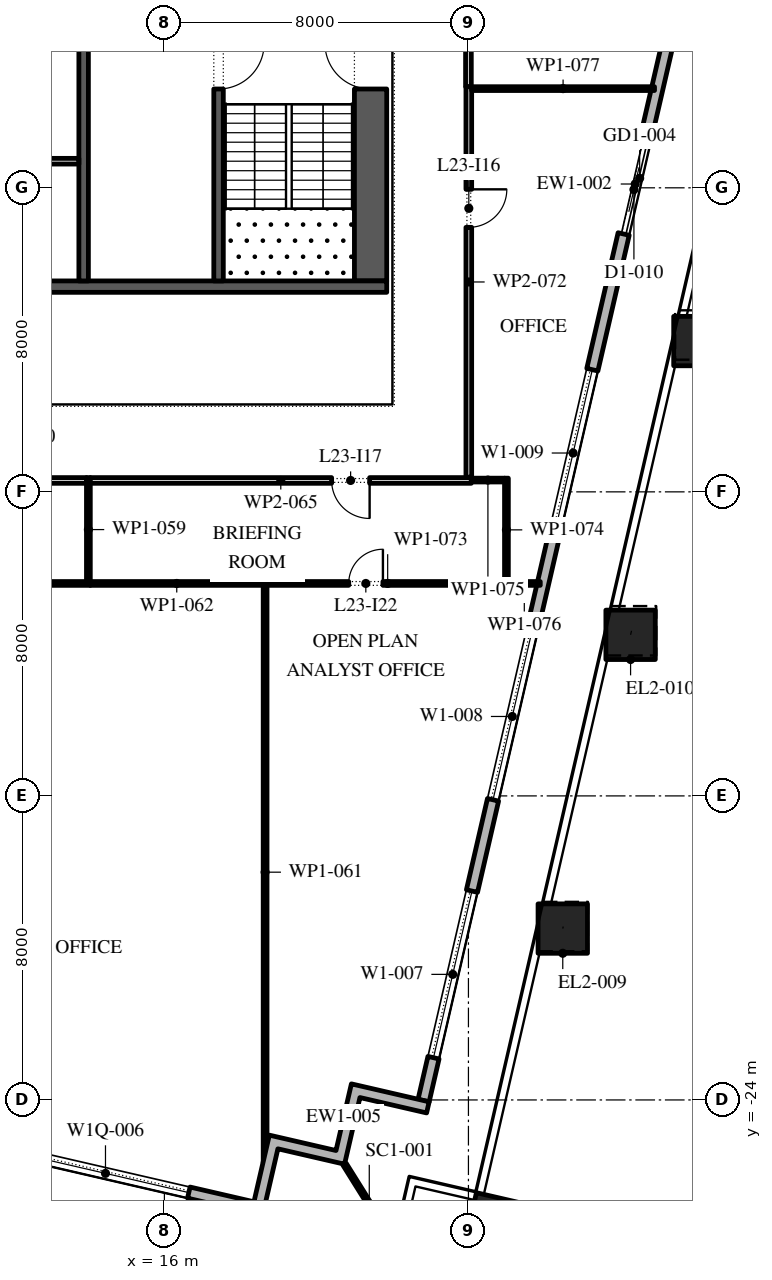
"""IFC4 building model, lengths in metres.
Left out: names, types, materials, properties, quantities, classifications, styles, units other than length and angle.
Written with IfcOpenShell. Run it as: python <this file> out.ifc"""

import sys

from ifc_helpers import new_model, si_unit, direction, frame, frame_2d, origin, origin_2d, place, context, subcontext, project, spatial, polyline, rectangle, outline, extrude, element, fill, save


model = new_model("IFC4")
c1 = context("Model", 3, precision=1e-05, world=origin(), true_north=direction((0.0, 1.0)))
c2 = subcontext(c1, "Body", "Model", "MODEL_VIEW")
j1 = project(units=[si_unit("LENGTHUNIT", "METRE"), si_unit("PLANEANGLEUNIT", "RADIAN")], contexts=[c1])
p1 = place(None, origin())
s1 = spatial("IfcSite", under=j1, at=p1, CompositionType="ELEMENT")
p2 = place(p1, origin())
s2 = spatial("IfcBuilding", under=s1, at=p2, CompositionType="ELEMENT")
p3 = place(p2, frame((0.0, 0.0, 109.8)))
s3 = spatial("IfcBuildingStorey", under=s2, at=p3, CompositionType="ELEMENT", Elevation=109.8)
p4 = place(p3, frame((24.698, -27.22, 0.0), z_axis=(0.0, 0.0, 1.0), x_axis=(0.974370064785, -0.224951054344, 0.0)))
e1 = element("IfcColumn", 1, at=p4, inside=s3, PredefinedType="COLUMN", context=c2, shape_type="SweptSolid", body=[
    extrude(rectangle(XDim=1.3, YDim=1.3, at=origin_2d()), origin(), (0.0, 0.0, 1.0), 4.2),
])
p5 = place(p3, frame((26.482, -19.491, 0.0), z_axis=(0.002906226325, 0.012613022249, 0.99991622925), x_axis=(-0.974466825284, 0.224531526563, 0.0)))
e2 = element("IfcColumn", 2, at=p5, inside=s3, PredefinedType="COLUMN", context=c2, shape_type="SweptSolid", body=[
    extrude(rectangle(XDim=1.3, YDim=1.3, at=origin_2d()), origin(), (0.0, 0.0, 1.0), 4.2),
])
p6 = place(p3, frame((28.267, -11.762, 0.0), z_axis=(0.005810983994, 0.025277780376, 0.999663576552), x_axis=(-0.974579651079, 0.224041299099, 0.0)))
e3 = element("IfcColumn", 3, at=p6, inside=s3, PredefinedType="COLUMN", context=c2, shape_type="SweptSolid", body=[
    extrude(rectangle(XDim=1.3, YDim=1.3, at=origin_2d()), origin(), (0.0, 0.0, 1.0), 4.201),
])
p7 = place(p3, frame((30.051, -4.032, 0.0), z_axis=(0.008770884695, 0.037929719907, 0.99924191662), x_axis=(-0.974290512438, 0.225295355862, 0.0)))
e4 = element("IfcColumn", 4, at=p7, inside=s3, PredefinedType="COLUMN", context=c2, shape_type="SweptSolid", body=[
    extrude(rectangle(XDim=1.3, YDim=1.3, at=origin_2d()), origin(), (0.0, 0.0, 1.0), 4.203),
])
p8 = place(p3, frame((-31.078, -15.421, 0.0), z_axis=(0.0, 0.0, 1.0), x_axis=(0.974370456532, -0.224949357493, 0.0)))
e5 = element("IfcWall", 5, at=p8, inside=s3, PredefinedType="STANDARD", context=c2, shape_type="SweptSolid", body=[
    extrude(rectangle(XDim=51.0, YDim=0.3, at=frame_2d((25.5, 0.0))), origin(), (0.0, 0.0, 1.0), 4.0),
])
p9 = place(p8, frame((1.875, 0.0, 0.45)))
e6 = element("IfcOpeningElement", 6, at=p9, cuts=e5, PredefinedType="OPENING", context=c2, shape_type="SweptSolid", body=[
    extrude(rectangle(XDim=4.5, YDim=2.65, at=frame_2d((2.25, 1.325))), frame((0.0, 0.16, 0.0), z_axis=(0.0, -1.0, 0.0), x_axis=(1.0, 0.0, 0.0)), (0.0, 0.0, 1.0), 0.32),
])
p10 = place(p8, frame((10.275, 0.0, 0.45)))
e7 = element("IfcOpeningElement", 7, at=p10, cuts=e5, PredefinedType="OPENING", context=c2, shape_type="SweptSolid", body=[
    extrude(rectangle(XDim=4.5, YDim=2.525, at=frame_2d((2.25, 1.262))), frame((0.0, 0.16, 0.0), z_axis=(0.0, -1.0, 0.0), x_axis=(1.0, 0.0, 0.0)), (0.0, 0.0, 1.0), 0.32),
])
p11 = place(p8, frame((18.825, 0.0, 0.45)))
e8 = element("IfcOpeningElement", 8, at=p11, cuts=e5, PredefinedType="OPENING", context=c2, shape_type="SweptSolid", body=[
    extrude(rectangle(XDim=4.5, YDim=2.5, at=frame_2d((2.25, 1.25))), frame((0.0, 0.16, 0.0), z_axis=(0.0, -1.0, 0.0), x_axis=(1.0, 0.0, 0.0)), (0.0, 0.0, 1.0), 0.32),
])
p12 = place(p8, frame((27.075, 0.0, 0.0)))
e9 = element("IfcOpeningElement", 9, at=p12, cuts=e5, PredefinedType="OPENING", context=c2, shape_type="SweptSolid", body=[
    extrude(rectangle(XDim=2.4, YDim=2.9, at=frame_2d((1.2, 1.45))), frame((0.0, 0.16, 0.0), z_axis=(0.0, -1.0, 0.0), x_axis=(1.0, 0.0, 0.0)), (0.0, 0.0, 1.0), 0.32),
])
p13 = place(p8, frame((35.925, 0.0, 0.45)))
e10 = element("IfcOpeningElement", 10, at=p13, cuts=e5, PredefinedType="OPENING", context=c2, shape_type="SweptSolid", body=[
    extrude(rectangle(XDim=4.5, YDim=2.45, at=frame_2d((2.25, 1.225))), frame((0.0, 0.16, 0.0), z_axis=(0.0, -1.0, 0.0), x_axis=(1.0, 0.0, 0.0)), (0.0, 0.0, 1.0), 0.32),
])
p14 = place(p8, frame((44.475, 0.0, 0.45)))
e11 = element("IfcOpeningElement", 11, at=p14, cuts=e5, PredefinedType="OPENING", context=c2, shape_type="SweptSolid", body=[
    extrude(rectangle(XDim=4.5, YDim=2.45, at=frame_2d((2.25, 1.225))), frame((0.0, 0.16, 0.0), z_axis=(0.0, -1.0, 0.0), x_axis=(1.0, 0.0, 0.0)), (0.0, 0.0, 1.0), 0.32),
])
p15 = place(p3, frame((22.82, -24.016, 0.0), z_axis=(0.0, 0.0, 1.0), x_axis=(0.224953880882, 0.974369412223, 0.0)))
e12 = element("IfcWall", 12, at=p15, inside=s3, PredefinedType="STANDARD", context=c2, shape_type="SweptSolid", body=[
    extrude(rectangle(XDim=49.5, YDim=0.3, at=frame_2d((24.75, 0.0))), origin(), (0.0, 0.0, 1.0), 4.0),
])
p16 = place(p15, frame((1.157, 0.0, 0.45)))
e13 = element("IfcOpeningElement", 13, at=p16, cuts=e12, PredefinedType="OPENING", context=c2, shape_type="SweptSolid", body=[
    extrude(rectangle(XDim=4.5, YDim=3.05, at=frame_2d((2.25, 1.525))), frame((0.0, 0.16, 0.0), z_axis=(0.0, -1.0, 0.0), x_axis=(1.0, 0.0, 0.0)), (0.0, 0.0, 1.0), 0.32),
])
p17 = place(p15, frame((8.121, 0.0, 0.45)))
e14 = element("IfcOpeningElement", 14, at=p17, cuts=e12, PredefinedType="OPENING", context=c2, shape_type="SweptSolid", body=[
    extrude(rectangle(XDim=4.5, YDim=3.05, at=frame_2d((2.25, 1.525))), frame((0.0, 0.16, 0.0), z_axis=(0.0, -1.0, 0.0), x_axis=(1.0, 0.0, 0.0)), (0.0, 0.0, 1.0), 0.32),
])
p18 = place(p15, frame((15.236, 0.0, 0.45)))
e15 = element("IfcOpeningElement", 15, at=p18, cuts=e12, PredefinedType="OPENING", context=c2, shape_type="SweptSolid", body=[
    extrude(rectangle(XDim=4.5, YDim=3.05, at=frame_2d((2.25, 1.525))), frame((0.0, 0.16, 0.0), z_axis=(0.0, -1.0, 0.0), x_axis=(1.0, 0.0, 0.0)), (0.0, 0.0, 1.0), 0.32),
])
p19 = place(p15, frame((23.4, 0.0, 0.0)))
e16 = element("IfcOpeningElement", 16, at=p19, cuts=e12, PredefinedType="OPENING", context=c2, shape_type="SweptSolid", body=[
    extrude(rectangle(XDim=2.4, YDim=3.5, at=frame_2d((1.2, 1.75))), frame((0.0, 0.16, 0.0), z_axis=(0.0, -1.0, 0.0), x_axis=(1.0, 0.0, 0.0)), (0.0, 0.0, 1.0), 0.32),
])
p20 = place(p15, frame((29.464, 0.0, 0.45)))
e17 = element("IfcOpeningElement", 17, at=p20, cuts=e12, PredefinedType="OPENING", context=c2, shape_type="SweptSolid", body=[
    extrude(rectangle(XDim=4.5, YDim=2.875, at=frame_2d((2.25, 1.438))), frame((0.0, 0.16, 0.0), z_axis=(0.0, -1.0, 0.0), x_axis=(1.0, 0.0, 0.0)), (0.0, 0.0, 1.0), 0.32),
])
p21 = place(p15, frame((36.579, 0.0, 0.45)))
e18 = element("IfcOpeningElement", 18, at=p21, cuts=e12, PredefinedType="OPENING", context=c2, shape_type="SweptSolid", body=[
    extrude(rectangle(XDim=4.5, YDim=2.825, at=frame_2d((2.25, 1.413))), frame((0.0, 0.16, 0.0), z_axis=(0.0, -1.0, 0.0), x_axis=(1.0, 0.0, 0.0)), (0.0, 0.0, 1.0), 0.32),
])
p22 = place(p15, frame((43.693, 0.0, 0.45)))
e19 = element("IfcOpeningElement", 19, at=p22, cuts=e12, PredefinedType="OPENING", context=c2, shape_type="SweptSolid", body=[
    extrude(rectangle(XDim=4.5, YDim=2.75, at=frame_2d((2.25, 1.375))), frame((0.0, 0.16, 0.0), z_axis=(0.0, -1.0, 0.0), x_axis=(1.0, 0.0, 0.0)), (0.0, 0.0, 1.0), 0.32),
])
p23 = place(p3, origin())
e20 = element("IfcWall", 20, at=p23, inside=s3, PredefinedType="STANDARD", context=c2, shape_type="SweptSolid", body=[
    extrude(outline(polyline([(20.515, -25.331), (20.92, -23.577), (22.967, -24.049), (22.899, -24.342), (21.145, -23.937), (20.74, -25.691), (18.986, -25.286), (18.649, -26.747), (18.357, -26.68), (18.762, -24.926), (20.515, -25.331)])), origin(), (0.0, 0.0, 1.0), 4.0),
])
p24 = place(p3, frame((20.74, -25.691, -0.05), z_axis=(0.0, 0.0, 1.0), x_axis=(0.529972121605, -0.848015064914, 0.0)))
e21 = element("IfcWall", 21, at=p24, inside=s3, PredefinedType="STANDARD", context=c2, shape_type="SweptSolid", body=[
    extrude(rectangle(XDim=2.455, YDim=0.1, at=frame_2d((1.228, 0.0))), origin(), (0.0, 0.0, 1.0), 4.05),
])
p25 = place(p3, frame((21.425, -2.45, 0.0), z_axis=(0.0, 0.0, 1.0), x_axis=(0.0, 1.0, 0.0)))
e22 = element("IfcWall", 22, at=p25, inside=s3, PredefinedType="SHEAR", context=c2, shape_type="SweptSolid", body=[
    extrude(rectangle(XDim=27.9, YDim=0.85, at=frame_2d((13.95, 0.0))), origin(), (0.0, 0.0, 1.0), 4.0),
])
p26 = place(p25, frame((5.05, 0.0, 0.0)))
e23 = element("IfcOpeningElement", 23, at=p26, cuts=e22, PredefinedType="OPENING", context=c2, shape_type="SweptSolid", body=[
    extrude(rectangle(XDim=1.2, YDim=2.1, at=frame_2d((0.6, 1.05))), frame((0.0, 0.435, 0.0), z_axis=(0.0, -1.0, 0.0), x_axis=(1.0, 0.0, 0.0)), (0.0, 0.0, 1.0), 0.87),
])
p27 = place(p25, frame((21.65, 0.0, 0.0)))
e24 = element("IfcOpeningElement", 24, at=p27, cuts=e22, PredefinedType="OPENING", context=c2, shape_type="SweptSolid", body=[
    extrude(rectangle(XDim=1.2, YDim=2.1, at=frame_2d((0.6, 1.05))), frame((0.0, 0.435, 0.0), z_axis=(0.0, -1.0, 0.0), x_axis=(1.0, 0.0, 0.0)), (0.0, 0.0, 1.0), 0.87),
])
p28 = place(p3, frame((10.15, -2.6, 0.0), z_axis=(0.0, 0.0, 1.0), x_axis=(1.0, 0.0, 0.0)))
e25 = element("IfcWall", 25, at=p28, inside=s3, PredefinedType="SHEAR", context=c2, shape_type="SweptSolid", body=[
    extrude(rectangle(XDim=11.7, YDim=0.3, at=frame_2d((5.85, 0.0))), origin(), (0.0, 0.0, 1.0), 4.0),
])
p29 = place(p3, frame((17.425, -2.45, 0.0), z_axis=(0.0, 0.0, 1.0), x_axis=(0.0, 1.0, 0.0)))
e26 = element("IfcWall", 26, at=p29, inside=s3, PredefinedType="SHEAR", context=c2, shape_type="SweptSolid", body=[
    extrude(rectangle(XDim=6.3, YDim=0.25, at=frame_2d((3.15, 0.0))), origin(), (0.0, 0.0, 1.0), 4.0),
])
p30 = place(p29, frame((5.05, 0.0, 0.0)))
e27 = element("IfcOpeningElement", 27, at=p30, cuts=e26, PredefinedType="OPENING", context=c2, shape_type="SweptSolid", body=[
    extrude(rectangle(XDim=1.2, YDim=2.1, at=frame_2d((0.6, 1.05))), frame((0.0, 0.135, 0.0), z_axis=(0.0, -1.0, 0.0), x_axis=(1.0, 0.0, 0.0)), (0.0, 0.0, 1.0), 0.27),
])
p31 = place(p3, frame((13.875, -2.45, 0.0), z_axis=(0.0, 0.0, 1.0), x_axis=(0.0, 1.0, 0.0)))
e28 = element("IfcWall", 28, at=p31, inside=s3, PredefinedType="SHEAR", context=c2, shape_type="SweptSolid", body=[
    extrude(rectangle(XDim=21.3, YDim=0.25, at=frame_2d((10.65, 0.0))), origin(), (0.0, 0.0, 1.0), 4.0),
])
p32 = place(p31, frame((14.571, 0.0, 0.0)))
e29 = element("IfcOpeningElement", 29, at=p32, cuts=e28, PredefinedType="OPENING", context=c2, shape_type="SweptSolid", body=[
    extrude(rectangle(XDim=0.9, YDim=2.1, at=frame_2d((0.45, 1.05))), frame((0.0, 0.135, 0.0), z_axis=(0.0, -1.0, 0.0), x_axis=(1.0, 0.0, 0.0)), (0.0, 0.0, 1.0), 0.27),
])
p33 = place(p31, frame((6.971, 0.0, 0.0)))
e30 = element("IfcOpeningElement", 30, at=p33, cuts=e28, PredefinedType="OPENING", context=c2, shape_type="SweptSolid", body=[
    extrude(rectangle(XDim=1.1, YDim=2.1, at=frame_2d((0.55, 1.05))), frame((0.0, 0.135, 0.0), z_axis=(0.0, -1.0, 0.0), x_axis=(1.0, 0.0, 0.0)), (0.0, 0.0, 1.0), 0.27),
])
p34 = place(p3, frame((11.0, 0.7, 0.0), z_axis=(0.0, 0.0, 1.0), x_axis=(1.0, 0.0, 0.0)))
e31 = element("IfcWall", 31, at=p34, inside=s3, PredefinedType="PARTITIONING", context=c2, shape_type="SweptSolid", body=[
    extrude(rectangle(XDim=2.75, YDim=0.15, at=frame_2d((1.375, 0.0))), origin(), (0.0, 0.0, 1.0), 4.0),
])
p35 = place(p3, frame((14.05, -10.41, 0.0), z_axis=(0.0, 0.0, 1.0), x_axis=(-1.0, 0.0, 0.0)))
e32 = element("IfcWall", 32, at=p35, inside=s3, PredefinedType="PARTITIONING", context=c2, shape_type="SweptSolid", body=[
    extrude(rectangle(XDim=7.66, YDim=0.1, at=frame_2d((3.83, 0.0))), origin(), (0.0, 0.0, 1.0), 4.0),
])
p36 = place(p35, frame((3.86, 0.0, 0.0)))
e33 = element("IfcOpeningElement", 33, at=p36, cuts=e32, PredefinedType="OPENING", context=c2, shape_type="SweptSolid", body=[
    extrude(rectangle(XDim=1.6, YDim=2.1, at=frame_2d((0.8, 1.05))), frame((0.0, 0.06, 0.0), z_axis=(0.0, -1.0, 0.0), x_axis=(1.0, 0.0, 0.0)), (0.0, 0.0, 1.0), 0.12),
])
p37 = place(p3, frame((14.0, -10.36, 0.0), z_axis=(0.0, 0.0, 1.0), x_axis=(0.0, 1.0, 0.0)))
e34 = element("IfcWall", 34, at=p37, inside=s3, PredefinedType="PARTITIONING", context=c2, shape_type="SweptSolid", body=[
    extrude(rectangle(XDim=2.735, YDim=0.1, at=frame_2d((1.368, 0.0))), origin(), (0.0, 0.0, 1.0), 4.0),
])
p38 = place(p3, frame((13.95, -7.7, 0.0), z_axis=(0.0, 0.0, 1.0), x_axis=(-1.0, 0.0, 0.0)))
e35 = element("IfcWall", 35, at=p38, inside=s3, PredefinedType="PARTITIONING", context=c2, shape_type="SweptSolid", body=[
    extrude(rectangle(XDim=5.875, YDim=0.15, at=frame_2d((2.938, 0.0))), origin(), (0.0, 0.0, 1.0), 4.0),
])
p39 = place(p3, frame((18.65, -25.654, 0.0), z_axis=(0.0, 0.0, 1.0), x_axis=(0.0, 1.0, 0.0)))
e36 = element("IfcWall", 36, at=p39, inside=s3, PredefinedType="PARTITIONING", context=c2, shape_type="SweptSolid", body=[
    extrude(rectangle(XDim=15.294, YDim=0.1, at=frame_2d((7.647, 0.0))), origin(), (0.0, 0.0, 1.0), 4.0),
])
p40 = place(p3, frame((18.6, -10.41, 0.0), z_axis=(0.0, 0.0, 1.0), x_axis=(-1.0, 0.0, 0.0)))
e37 = element("IfcWall", 37, at=p40, inside=s3, PredefinedType="PARTITIONING", context=c2, shape_type="SweptSolid", body=[
    extrude(rectangle(XDim=4.55, YDim=0.1, at=frame_2d((2.275, 0.0))), origin(), (0.0, 0.0, 1.0), 4.0),
])
p41 = place(p3, frame((24.075, -7.7, 0.0), z_axis=(0.0, 0.0, 1.0), x_axis=(-1.0, 0.0, 0.0)))
e38 = element("IfcWall", 38, at=p41, inside=s3, PredefinedType="PARTITIONING", context=c2, shape_type="SweptSolid", body=[
    extrude(rectangle(XDim=10.025, YDim=0.15, at=frame_2d((5.012, 0.0))), origin(), (0.0, 0.0, 1.0), 4.0),
])
p42 = place(p41, frame((2.675, 0.0, 0.0)))
e39 = element("IfcOpeningElement", 39, at=p42, cuts=e38, PredefinedType="OPENING", context=c2, shape_type="SweptSolid", body=[
    extrude(rectangle(XDim=1.0, YDim=2.1, at=frame_2d((0.5, 1.05))), frame((0.0, 0.085, 0.0), z_axis=(0.0, -1.0, 0.0), x_axis=(1.0, 0.0, 0.0)), (0.0, 0.0, 1.0), 0.17),
])
p43 = place(p3, frame((24.0, 9.5, 0.0), z_axis=(0.0, 0.0, 1.0), x_axis=(0.0, -1.0, 0.0)))
e40 = element("IfcWall", 40, at=p43, inside=s3, PredefinedType="PARTITIONING", context=c2, shape_type="SweptSolid", body=[
    extrude(rectangle(XDim=6.84, YDim=0.15, at=frame_2d((3.42, 0.0))), origin(), (0.0, 0.0, 1.0), 4.0),
])
p44 = place(p43, frame((4.24, 0.0, 0.0)))
e41 = element("IfcOpeningElement", 41, at=p44, cuts=e40, PredefinedType="OPENING", context=c2, shape_type="SweptSolid", body=[
    extrude(rectangle(XDim=1.0, YDim=2.1, at=frame_2d((0.5, 1.05))), frame((0.0, 0.085, 0.0), z_axis=(0.0, -1.0, 0.0), x_axis=(1.0, 0.0, 0.0)), (0.0, 0.0, 1.0), 0.17),
])
p45 = place(p3, frame((24.01, 2.66, 0.0), z_axis=(0.0, 0.0, 1.0), x_axis=(0.0, -1.0, 0.0)))
e42 = element("IfcWall", 42, at=p45, inside=s3, PredefinedType="PARTITIONING", context=c2, shape_type="SweptSolid", body=[
    extrude(rectangle(XDim=10.275, YDim=0.15, at=frame_2d((5.137, 0.0))), origin(), (0.0, 0.0, 1.0), 4.0),
])
p46 = place(p45, frame((2.7, 0.0, 0.0)))
e43 = element("IfcOpeningElement", 43, at=p46, cuts=e42, PredefinedType="OPENING", context=c2, shape_type="SweptSolid", body=[
    extrude(rectangle(XDim=1.0, YDim=2.1, at=frame_2d((0.5, 1.05))), frame((0.0, 0.085, 0.0), z_axis=(0.0, -1.0, 0.0), x_axis=(1.0, 0.0, 0.0)), (0.0, 0.0, 1.0), 0.17),
])
p47 = place(p3, frame((25.05, -10.41, 0.0), z_axis=(0.0, 0.0, 1.0), x_axis=(-1.0, 0.0, 0.0)))
e44 = element("IfcWall", 44, at=p47, inside=s3, PredefinedType="PARTITIONING", context=c2, shape_type="SweptSolid", body=[
    extrude(rectangle(XDim=6.35, YDim=0.1, at=frame_2d((3.175, 0.0))), origin(), (0.0, 0.0, 1.0), 4.0),
])
p48 = place(p47, frame((3.3, 0.0, 0.0)))
e45 = element("IfcOpeningElement", 45, at=p48, cuts=e44, PredefinedType="OPENING", context=c2, shape_type="SweptSolid", body=[
    extrude(rectangle(XDim=0.9, YDim=2.1, at=frame_2d((0.45, 1.05))), frame((0.0, 0.06, 0.0), z_axis=(0.0, -1.0, 0.0), x_axis=(1.0, 0.0, 0.0)), (0.0, 0.0, 1.0), 0.12),
])
p49 = place(p3, frame((25.0, -10.36, 0.0), z_axis=(0.0, 0.0, 1.0), x_axis=(0.0, 1.0, 0.0)))
e46 = element("IfcWall", 46, at=p49, inside=s3, PredefinedType="PARTITIONING", context=c2, shape_type="SweptSolid", body=[
    extrude(rectangle(XDim=2.72, YDim=0.1, at=frame_2d((1.36, 0.0))), origin(), (0.0, 0.0, 1.0), 4.0),
])
p50 = place(p3, frame((24.95, -7.69, 0.0), z_axis=(0.0, 0.0, 1.0), x_axis=(-1.0, 0.0, 0.0)))
e47 = element("IfcWall", 47, at=p50, inside=s3, PredefinedType="PARTITIONING", context=c2, shape_type="SweptSolid", body=[
    extrude(rectangle(XDim=0.875, YDim=0.1, at=frame_2d((0.438, 0.0))), origin(), (0.0, 0.0, 1.0), 4.0),
])
p51 = place(p3, frame((25.89, -10.41, 0.0), z_axis=(0.0, 0.0, 1.0), x_axis=(-1.0, 0.0, 0.0)))
e48 = element("IfcWall", 48, at=p51, inside=s3, PredefinedType="PARTITIONING", context=c2, shape_type="SweptSolid", body=[
    extrude(rectangle(XDim=0.84, YDim=0.1, at=frame_2d((0.42, 0.0))), origin(), (0.0, 0.0, 1.0), 4.0),
])
p52 = place(p3, frame((28.896, 2.61, 0.0), z_axis=(0.0, 0.0, 1.0), x_axis=(-1.0, 0.0, 0.0)))
e49 = element("IfcWall", 49, at=p52, inside=s3, PredefinedType="PARTITIONING", context=c2, shape_type="SweptSolid", body=[
    extrude(rectangle(XDim=4.811, YDim=0.1, at=frame_2d((2.406, 0.0))), origin(), (0.0, 0.0, 1.0), 4.0),
])
p53 = place(p14, origin())
e50 = element("IfcWindow", 50, at=p53, inside=s3, PartitioningType="DOUBLE_PANEL_VERTICAL", PredefinedType="WINDOW", context=c2, shape_type="SweptSolid", body=[
    extrude(rectangle(XDim=4.5, YDim=2.45, at=frame_2d((2.25, 1.225))), frame((0.0, 0.03, 0.0), z_axis=(0.0, -1.0, 0.0), x_axis=(1.0, 0.0, 0.0)), (0.0, 0.0, 1.0), 0.06),
])
fill(e11, e50)
p54 = place(p16, origin())
e51 = element("IfcWindow", 51, at=p54, inside=s3, PartitioningType="DOUBLE_PANEL_VERTICAL", PredefinedType="WINDOW", context=c2, shape_type="SweptSolid", body=[
    extrude(rectangle(XDim=4.5, YDim=3.05, at=frame_2d((2.25, 1.525))), frame((0.0, 0.03, 0.0), z_axis=(0.0, -1.0, 0.0), x_axis=(1.0, 0.0, 0.0)), (0.0, 0.0, 1.0), 0.06),
])
fill(e13, e51)
p55 = place(p17, origin())
e52 = element("IfcWindow", 52, at=p55, inside=s3, PartitioningType="DOUBLE_PANEL_VERTICAL", PredefinedType="WINDOW", context=c2, shape_type="SweptSolid", body=[
    extrude(rectangle(XDim=4.5, YDim=3.05, at=frame_2d((2.25, 1.525))), frame((0.0, 0.03, 0.0), z_axis=(0.0, -1.0, 0.0), x_axis=(1.0, 0.0, 0.0)), (0.0, 0.0, 1.0), 0.06),
])
fill(e14, e52)
p56 = place(p18, origin())
e53 = element("IfcWindow", 53, at=p56, inside=s3, PartitioningType="DOUBLE_PANEL_VERTICAL", PredefinedType="WINDOW", context=c2, shape_type="SweptSolid", body=[
    extrude(rectangle(XDim=4.5, YDim=3.05, at=frame_2d((2.25, 1.525))), frame((0.0, 0.03, 0.0), z_axis=(0.0, -1.0, 0.0), x_axis=(1.0, 0.0, 0.0)), (0.0, 0.0, 1.0), 0.06),
])
fill(e15, e53)
p57 = place(p19, origin())
e54 = element("IfcDoor", 54, at=p57, inside=s3, OperationType="DOUBLE_DOOR_SLIDING", PredefinedType="DOOR", context=c2, shape_type="SweptSolid", body=[
    extrude(rectangle(XDim=2.4, YDim=3.5, at=frame_2d((1.2, 1.75))), frame((0.0, 0.025, 0.0), z_axis=(0.0, -1.0, 0.0), x_axis=(1.0, 0.0, 0.0)), (0.0, 0.0, 1.0), 0.05),
])
fill(e16, e54)
p58 = place(p30, frame((1.2, 0.0, 0.0), z_axis=(0.0, 0.0, 1.0), x_axis=(-1.0, 0.0, 0.0)))
e55 = element("IfcDoor", 55, at=p58, inside=s3, OperationType="SINGLE_SWING_RIGHT", PredefinedType="DOOR", context=c2, shape_type="SweptSolid", body=[
    extrude(rectangle(XDim=1.2, YDim=2.1, at=frame_2d((0.6, 1.05))), frame((0.0, 0.025, 0.0), z_axis=(0.0, -1.0, 0.0), x_axis=(1.0, 0.0, 0.0)), (0.0, 0.0, 1.0), 0.05),
])
fill(e27, e55)
p59 = place(p26, origin())
e56 = element("IfcDoor", 56, at=p59, inside=s3, OperationType="SINGLE_SWING_LEFT", PredefinedType="DOOR", context=c2, shape_type="SweptSolid", body=[
    extrude(rectangle(XDim=1.2, YDim=2.1, at=frame_2d((0.6, 1.05))), frame((0.0, 0.025, 0.0), z_axis=(0.0, -1.0, 0.0), x_axis=(1.0, 0.0, 0.0)), (0.0, 0.0, 1.0), 0.05),
])
fill(e23, e56)
p60 = place(p46, origin())
e57 = element("IfcDoor", 57, at=p60, inside=s3, OperationType="SINGLE_SWING_RIGHT", PredefinedType="DOOR", context=c2, shape_type="SweptSolid", body=[
    extrude(rectangle(XDim=1.0, YDim=2.1, at=frame_2d((0.5, 1.05))), frame((0.0, 0.025, 0.0), z_axis=(0.0, -1.0, 0.0), x_axis=(1.0, 0.0, 0.0)), (0.0, 0.0, 1.0), 0.05),
])
fill(e43, e57)
p61 = place(p42, origin())
e58 = element("IfcDoor", 58, at=p61, inside=s3, OperationType="SINGLE_SWING_RIGHT", PredefinedType="DOOR", context=c2, shape_type="SweptSolid", body=[
    extrude(rectangle(XDim=1.0, YDim=2.1, at=frame_2d((0.5, 1.05))), frame((0.0, 0.025, 0.0), z_axis=(0.0, -1.0, 0.0), x_axis=(1.0, 0.0, 0.0)), (0.0, 0.0, 1.0), 0.05),
])
fill(e39, e58)
p62 = place(p48, frame((0.9, 0.0, 0.0), z_axis=(0.0, 0.0, 1.0), x_axis=(-1.0, 0.0, 0.0)))
e59 = element("IfcDoor", 59, at=p62, inside=s3, OperationType="SINGLE_SWING_LEFT", PredefinedType="DOOR", context=c2, shape_type="SweptSolid", body=[
    extrude(rectangle(XDim=0.9, YDim=2.1, at=frame_2d((0.45, 1.05))), frame((0.0, 0.025, 0.0), z_axis=(0.0, -1.0, 0.0), x_axis=(1.0, 0.0, 0.0)), (0.0, 0.0, 1.0), 0.05),
])
fill(e45, e59)
save(model, sys.argv[1])
